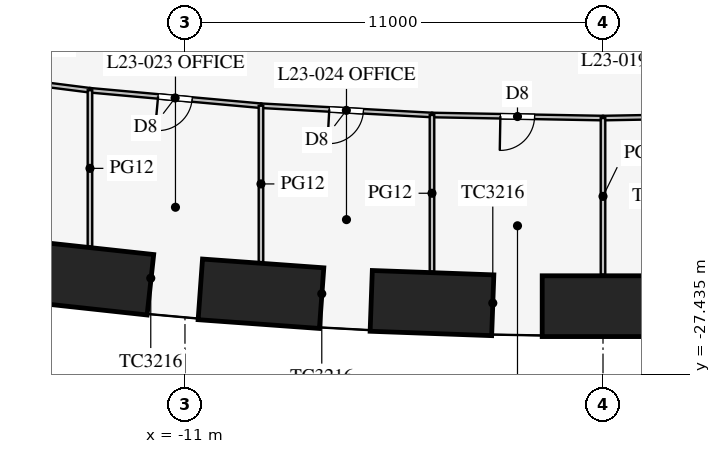
"""IFC4 building model, lengths in metres.
Left out: names, types, materials, properties, quantities, classifications, styles, units other than length and angle.
Written with IfcOpenShell. Run it as: python <this file> out.ifc"""

import sys

from ifc_helpers import new_model, si_unit, direction, frame, frame_2d, origin, origin_2d, place, context, subcontext, project, spatial, rectangle, extrude, element, fill, save


model = new_model("IFC4")
c1 = context("Model", 3, precision=1e-05, world=origin(), true_north=direction((0.0, 1.0)))
c2 = subcontext(c1, "Body", "Model", "MODEL_VIEW")
j1 = project(units=[si_unit("LENGTHUNIT", "METRE"), si_unit("PLANEANGLEUNIT", "RADIAN")], contexts=[c1])
p1 = place(None, origin())
s1 = spatial("IfcSite", under=j1, at=p1, CompositionType="ELEMENT")
p2 = place(p1, origin())
s2 = spatial("IfcBuilding", under=s1, at=p2, CompositionType="ELEMENT")
p3 = place(p2, frame((0.0, 0.0, 103.1)))
s3 = spatial("IfcBuildingStorey", under=s2, at=p3, CompositionType="ELEMENT", Elevation=103.1)
for number, where, z_axis, x_axis in (
    (1, (-13.5, -24.913, 0.0), (0.0, 0.0, 1.0), (0.994, -0.108, 0.0)),
    (2, (-9.0, -25.323, 0.0), (0.0, 0.0, 1.0), (0.997, -0.072, 0.0)),
    (3, (-4.5, -25.568, 0.0), (0.0, 0.0, 1.0), (0.999, -0.036, 0.0)),
    (4, (0.0, -25.65, 0.0), (0.0, 0.0, 1.0), (1.0, 0.0, 0.0)),
):
    element("IfcColumn", number, at=place(p3, frame(where, z_axis=z_axis, x_axis=x_axis)), inside=s3, PredefinedType="COLUMN", context=c2, shape_type="SweptSolid", body=[
        extrude(rectangle(XDim=3.2, YDim=1.6, at=origin_2d()), origin(), (0.0, 0.0, 1.0), 4.2),
    ])
p4 = place(p3, frame((0.0, -20.7, 0.0), z_axis=(0.0, 0.0, 1.0), x_axis=(0.999837820638, 0.018009231578, 0.0)))
e5 = element("IfcWall", 5, at=p4, inside=s3, PredefinedType="PARTITIONING", context=c2, shape_type="SweptSolid", body=[
    extrude(rectangle(XDim=4.501, YDim=0.12, at=frame_2d((2.25, 0.0))), origin(), (0.0, 0.0, 1.0), 2.9),
])
p5 = place(p4, frame((1.8, 0.0, 0.15)))
e6 = element("IfcOpeningElement", 6, at=p5, cuts=e5, PredefinedType="OPENING", context=c2, shape_type="SweptSolid", body=[
    extrude(rectangle(XDim=0.9, YDim=2.1, at=frame_2d((0.45, 1.05))), frame((0.0, 0.07, 0.0), z_axis=(0.0, -1.0, 0.0), x_axis=(1.0, 0.0, 0.0)), (0.0, 0.0, 1.0), 0.14),
])
p6 = place(p3, frame((-13.5, -19.968, 0.0), z_axis=(0.0, 0.0, 1.0), x_axis=(0.995930325215, -0.090126507295, 0.0)))
e7 = element("IfcWall", 7, at=p6, inside=s3, PredefinedType="PARTITIONING", context=c2, shape_type="SweptSolid", body=[
    extrude(rectangle(XDim=4.518, YDim=0.12, at=frame_2d((2.259, 0.0))), origin(), (0.0, 0.0, 1.0), 2.9),
])
p7 = place(p6, frame((1.8, 0.0, 0.15)))
e8 = element("IfcOpeningElement", 8, at=p7, cuts=e7, PredefinedType="OPENING", context=c2, shape_type="SweptSolid", body=[
    extrude(rectangle(XDim=0.9, YDim=2.1, at=frame_2d((0.45, 1.05))), frame((0.0, 0.07, 0.0), z_axis=(0.0, -1.0, 0.0), x_axis=(1.0, 0.0, 0.0)), (0.0, 0.0, 1.0), 0.14),
])
p8 = place(p3, frame((-18.0, -19.396, 0.0), z_axis=(0.0, 0.0, 1.0), x_axis=(0.992010652594, -0.12615413247, 0.0)))
e9 = element("IfcWall", 9, at=p8, inside=s3, PredefinedType="PARTITIONING", context=c2, shape_type="SweptSolid", body=[
    extrude(rectangle(XDim=4.536, YDim=0.12, at=frame_2d((2.268, 0.0))), origin(), (0.0, 0.0, 1.0), 2.9),
])
p9 = place(p8, frame((1.8, 0.0, 0.15)))
e10 = element("IfcOpeningElement", 10, at=p9, cuts=e9, PredefinedType="OPENING", context=c2, shape_type="SweptSolid", body=[
    extrude(rectangle(XDim=0.9, YDim=2.1, at=frame_2d((0.45, 1.05))), frame((0.0, 0.07, 0.0), z_axis=(0.0, -1.0, 0.0), x_axis=(1.0, 0.0, 0.0)), (0.0, 0.0, 1.0), 0.14),
])
p10 = place(p3, frame((-4.5, -20.619, 0.0), z_axis=(0.0, 0.0, 1.0), x_axis=(0.999837820638, -0.018009231578, 0.0)))
e11 = element("IfcWall", 11, at=p10, inside=s3, PredefinedType="PARTITIONING", context=c2, shape_type="SweptSolid", body=[
    extrude(rectangle(XDim=4.501, YDim=0.12, at=frame_2d((2.25, 0.0))), origin(), (0.0, 0.0, 1.0), 2.9),
])
p11 = place(p10, frame((1.8, 0.0, 0.15)))
e12 = element("IfcOpeningElement", 12, at=p11, cuts=e11, PredefinedType="OPENING", context=c2, shape_type="SweptSolid", body=[
    extrude(rectangle(XDim=0.9, YDim=2.1, at=frame_2d((0.45, 1.05))), frame((0.0, 0.07, 0.0), z_axis=(0.0, -1.0, 0.0), x_axis=(1.0, 0.0, 0.0)), (0.0, 0.0, 1.0), 0.14),
])
p12 = place(p3, frame((-9.0, -20.375, 0.0), z_axis=(0.0, 0.0, 1.0), x_axis=(0.998537376538, -0.054065771581, 0.0)))
e13 = element("IfcWall", 13, at=p12, inside=s3, PredefinedType="PARTITIONING", context=c2, shape_type="SweptSolid", body=[
    extrude(rectangle(XDim=4.507, YDim=0.12, at=frame_2d((2.253, 0.0))), origin(), (0.0, 0.0, 1.0), 2.9),
])
p13 = place(p12, frame((1.8, 0.0, 0.15)))
e14 = element("IfcOpeningElement", 14, at=p13, cuts=e13, PredefinedType="OPENING", context=c2, shape_type="SweptSolid", body=[
    extrude(rectangle(XDim=0.9, YDim=2.1, at=frame_2d((0.45, 1.05))), frame((0.0, 0.07, 0.0), z_axis=(0.0, -1.0, 0.0), x_axis=(1.0, 0.0, 0.0)), (0.0, 0.0, 1.0), 0.14),
])
p14 = place(p3, frame((0.0, -20.7, 0.0), z_axis=(0.0, 0.0, 1.0), x_axis=(0.0, -1.0, 0.0)))
e15 = element("IfcWall", 15, at=p14, inside=s3, PredefinedType="PARTITIONING", context=c2, shape_type="SweptSolid", body=[
    extrude(rectangle(XDim=4.12, YDim=0.12, at=frame_2d((2.06, 0.0))), origin(), (0.0, 0.0, 1.0), 2.4),
])
p15 = place(p3, frame((-13.5, -19.968, 0.0), z_axis=(0.0, 0.0, 1.0), x_axis=(0.0, -1.0, 0.0)))
e16 = element("IfcWall", 16, at=p15, inside=s3, PredefinedType="PARTITIONING", context=c2, shape_type="SweptSolid", body=[
    extrude(rectangle(XDim=4.11, YDim=0.12, at=frame_2d((2.055, 0.0))), origin(), (0.0, 0.0, 1.0), 2.2),
])
p16 = place(p3, frame((-4.5, -20.619, 0.0), z_axis=(0.0, 0.0, 1.0), x_axis=(0.0, -1.0, 0.0)))
e17 = element("IfcWall", 17, at=p16, inside=s3, PredefinedType="PARTITIONING", context=c2, shape_type="SweptSolid", body=[
    extrude(rectangle(XDim=4.119, YDim=0.12, at=frame_2d((2.06, 0.0))), origin(), (0.0, 0.0, 1.0), 2.4),
])
p17 = place(p3, frame((-9.0, -20.375, 0.0), z_axis=(0.0, 0.0, 1.0), x_axis=(0.0, -1.0, 0.0)))
e18 = element("IfcWall", 18, at=p17, inside=s3, PredefinedType="PARTITIONING", context=c2, shape_type="SweptSolid", body=[
    extrude(rectangle(XDim=4.116, YDim=0.12, at=frame_2d((2.058, 0.0))), origin(), (0.0, 0.0, 1.0), 2.6),
])
p18 = place(p7, frame((0.9, 0.0, 0.0), z_axis=(0.0, 0.0, 1.0), x_axis=(-1.0, 0.0, 0.0)))
e19 = element("IfcDoor", 19, at=p18, inside=s3, OperationType="SINGLE_SWING_RIGHT", PredefinedType="DOOR", context=c2, shape_type="SweptSolid", body=[
    extrude(rectangle(XDim=0.9, YDim=2.1, at=frame_2d((0.45, 1.05))), frame((0.0, 0.025, 0.0), z_axis=(0.0, -1.0, 0.0), x_axis=(1.0, 0.0, 0.0)), (0.0, 0.0, 1.0), 0.05),
])
fill(e8, e19)
p19 = place(p13, frame((0.9, 0.0, 0.0), z_axis=(0.0, 0.0, 1.0), x_axis=(-1.0, 0.0, 0.0)))
e20 = element("IfcDoor", 20, at=p19, inside=s3, OperationType="SINGLE_SWING_RIGHT", PredefinedType="DOOR", context=c2, shape_type="SweptSolid", body=[
    extrude(rectangle(XDim=0.9, YDim=2.1, at=frame_2d((0.45, 1.05))), frame((0.0, 0.025, 0.0), z_axis=(0.0, -1.0, 0.0), x_axis=(1.0, 0.0, 0.0)), (0.0, 0.0, 1.0), 0.05),
])
fill(e14, e20)
p20 = place(p11, frame((0.9, 0.0, 0.0), z_axis=(0.0, 0.0, 1.0), x_axis=(-1.0, 0.0, 0.0)))
e21 = element("IfcDoor", 21, at=p20, inside=s3, OperationType="SINGLE_SWING_RIGHT", PredefinedType="DOOR", context=c2, shape_type="SweptSolid", body=[
    extrude(rectangle(XDim=0.9, YDim=2.1, at=frame_2d((0.45, 1.05))), frame((0.0, 0.025, 0.0), z_axis=(0.0, -1.0, 0.0), x_axis=(1.0, 0.0, 0.0)), (0.0, 0.0, 1.0), 0.05),
])
fill(e12, e21)
save(model, sys.argv[1])
